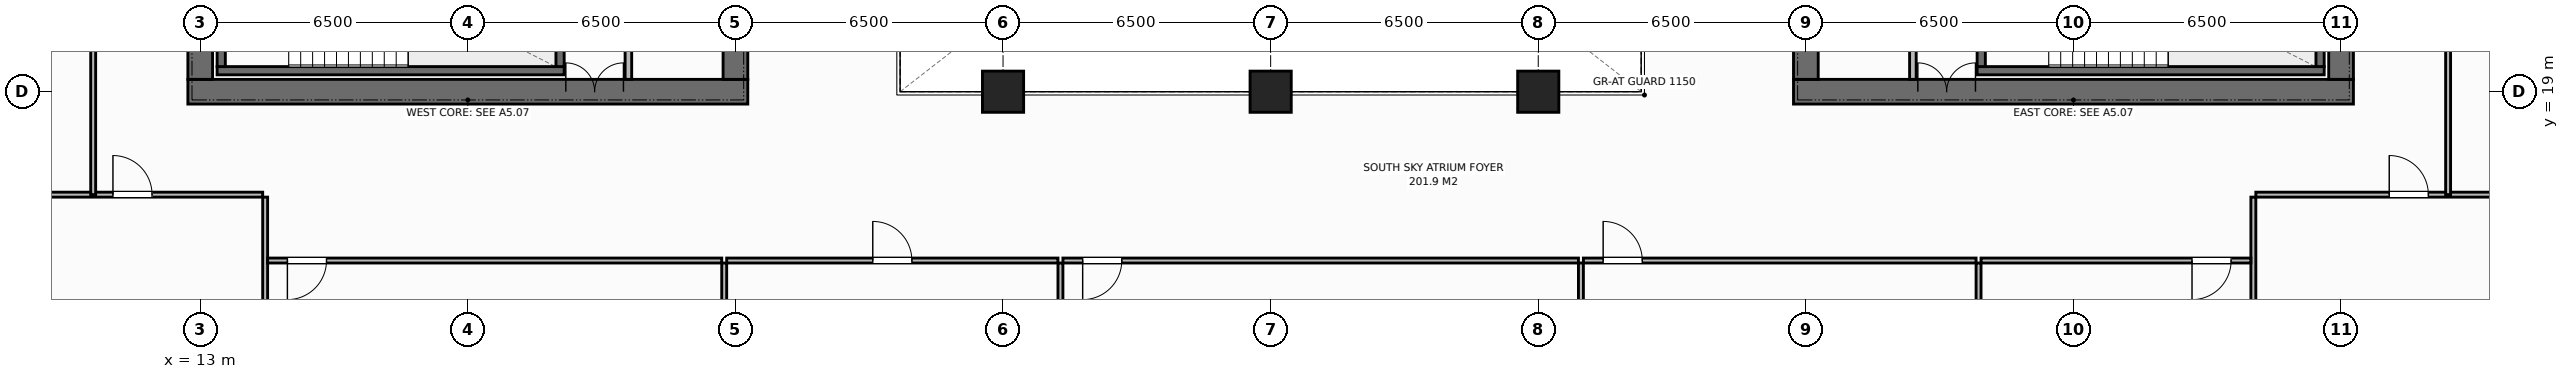
"""IFC4 building model, lengths in metres.
Left out: names, types, materials, properties, quantities, classifications, styles, units other than length and angle.
Written with IfcOpenShell. Run it as: python <this file> out.ifc"""

import sys

from ifc_helpers import new_model, si_unit, direction, frame, frame_2d, origin, origin_2d, place, context, subcontext, project, spatial, rectangle, extrude, element, fill, save


model = new_model("IFC4")
c1 = context("Model", 3, precision=1e-05, world=origin(), true_north=direction((0.0, 1.0)))
c2 = subcontext(c1, "Body", "Model", "MODEL_VIEW")
j1 = project(units=[si_unit("LENGTHUNIT", "METRE"), si_unit("PLANEANGLEUNIT", "RADIAN")], contexts=[c1])
p1 = place(None, origin())
s1 = spatial("IfcSite", under=j1, at=p1, CompositionType="ELEMENT")
p2 = place(p1, origin())
s2 = spatial("IfcBuilding", under=s1, at=p2, CompositionType="ELEMENT")
p3 = place(p2, frame((0.0, 0.0, 193.6)))
s3 = spatial("IfcBuildingStorey", under=s2, at=p3, CompositionType="ELEMENT", Elevation=193.6)
p4 = place(p3, frame((12.7, 19.0, 0.0), z_axis=(0.0, 0.0, 1.0), x_axis=(1.0, 0.0, 0.0)))
e1 = element("IfcWall", 1, at=p4, inside=s3, PredefinedType="SHEAR", context=c2, shape_type="SweptSolid", body=[
    extrude(rectangle(XDim=13.6, YDim=0.6, at=frame_2d((6.8, 0.0))), origin(), (0.0, 0.0, 1.0), 3.8),
])
p5 = place(p4, frame((9.18, 0.0, 0.0)))
e2 = element("IfcOpeningElement", 2, at=p5, cuts=e1, PredefinedType="OPENING", context=c2, shape_type="SweptSolid", body=[
    extrude(rectangle(XDim=1.4, YDim=2.2, at=frame_2d((0.7, 1.1))), frame((0.0, 0.31, 0.0), z_axis=(0.0, -1.0, 0.0), x_axis=(1.0, 0.0, 0.0)), (0.0, 0.0, 1.0), 0.62),
])
p6 = place(p3, frame((13.0, 19.3, 0.0), z_axis=(0.0, 0.0, 1.0), x_axis=(0.0, 1.0, 0.0)))
e3 = element("IfcWall", 3, at=p6, inside=s3, PredefinedType="SHEAR", context=c2, shape_type="SweptSolid", body=[
    extrude(rectangle(XDim=13.4, YDim=0.6, at=frame_2d((6.7, 0.0))), origin(), (0.0, 0.0, 1.0), 3.8),
])
p7 = place(p6, frame((4.75, 0.0, 0.0)))
e4 = element("IfcOpeningElement", 4, at=p7, cuts=e3, PredefinedType="OPENING", context=c2, shape_type="SweptSolid", body=[
    extrude(rectangle(XDim=1.4, YDim=2.2, at=frame_2d((0.7, 1.1))), frame((0.0, 0.31, 0.0), z_axis=(0.0, -1.0, 0.0), x_axis=(1.0, 0.0, 0.0)), (0.0, 0.0, 1.0), 0.62),
])
p8 = place(p3, frame((26.0, 19.3, 0.0), z_axis=(0.0, 0.0, 1.0), x_axis=(0.0, 1.0, 0.0)))
e5 = element("IfcWall", 5, at=p8, inside=s3, PredefinedType="SHEAR", context=c2, shape_type="SweptSolid", body=[
    extrude(rectangle(XDim=13.4, YDim=0.6, at=frame_2d((6.7, 0.0))), origin(), (0.0, 0.0, 1.0), 3.8),
])
p9 = place(p3, frame((51.7, 19.0, 0.0), z_axis=(0.0, 0.0, 1.0), x_axis=(1.0, 0.0, 0.0)))
e6 = element("IfcWall", 6, at=p9, inside=s3, PredefinedType="SHEAR", context=c2, shape_type="SweptSolid", body=[
    extrude(rectangle(XDim=13.6, YDim=0.6, at=frame_2d((6.8, 0.0))), origin(), (0.0, 0.0, 1.0), 3.8),
])
p10 = place(p9, frame((3.02, 0.0, 0.0)))
e7 = element("IfcOpeningElement", 7, at=p10, cuts=e6, PredefinedType="OPENING", context=c2, shape_type="SweptSolid", body=[
    extrude(rectangle(XDim=1.4, YDim=2.2, at=frame_2d((0.7, 1.1))), frame((0.0, 0.31, 0.0), z_axis=(0.0, -1.0, 0.0), x_axis=(1.0, 0.0, 0.0)), (0.0, 0.0, 1.0), 0.62),
])
p11 = place(p3, frame((52.0, 19.3, 0.0), z_axis=(0.0, 0.0, 1.0), x_axis=(0.0, 1.0, 0.0)))
e8 = element("IfcWall", 8, at=p11, inside=s3, PredefinedType="SHEAR", context=c2, shape_type="SweptSolid", body=[
    extrude(rectangle(XDim=13.4, YDim=0.6, at=frame_2d((6.7, 0.0))), origin(), (0.0, 0.0, 1.0), 3.8),
])
p12 = place(p3, frame((65.0, 19.3, 0.0), z_axis=(0.0, 0.0, 1.0), x_axis=(0.0, 1.0, 0.0)))
e9 = element("IfcWall", 9, at=p12, inside=s3, PredefinedType="SHEAR", context=c2, shape_type="SweptSolid", body=[
    extrude(rectangle(XDim=13.4, YDim=0.6, at=frame_2d((6.7, 0.0))), origin(), (0.0, 0.0, 1.0), 3.8),
])
p13 = place(p12, frame((8.15, 0.0, 0.0)))
e10 = element("IfcOpeningElement", 10, at=p13, cuts=e9, PredefinedType="OPENING", context=c2, shape_type="SweptSolid", body=[
    extrude(rectangle(XDim=1.3, YDim=2.2, at=frame_2d((0.65, 1.1))), frame((0.0, 0.31, 0.0), z_axis=(0.0, -1.0, 0.0), x_axis=(1.0, 0.0, 0.0)), (0.0, 0.0, 1.0), 0.62),
])
p14 = place(p3, frame((13.41, 19.51, 0.0), z_axis=(0.0, 0.0, 1.0), x_axis=(1.0, 0.0, 0.0)))
e11 = element("IfcWall", 11, at=p14, inside=s3, PredefinedType="SHEAR", context=c2, shape_type="SweptSolid", body=[
    extrude(rectangle(XDim=8.43, YDim=0.2, at=frame_2d((4.215, 0.0))), origin(), (0.0, 0.0, 1.0), 3.8),
])
for number, where, z_axis, x_axis in (
    (12, (13.51, 19.61, 0.0), (0.0, 0.0, 1.0), (0.0, 1.0, 0.0)),
    (13, (21.74, 19.61, 0.0), (0.0, 0.0, 1.0), (0.0, 1.0, 0.0)),
):
    element("IfcWall", number, at=place(p3, frame(where, z_axis=z_axis, x_axis=x_axis)), inside=s3, PredefinedType="SHEAR", context=c2, shape_type="SweptSolid", body=[
        extrude(rectangle(XDim=3.28, YDim=0.2, at=frame_2d((1.64, 0.0))), origin(), (0.0, 0.0, 1.0), 3.8),
    ])
p15 = place(p3, frame((56.16, 19.51, 0.0), z_axis=(0.0, 0.0, 1.0), x_axis=(1.0, 0.0, 0.0)))
e14 = element("IfcWall", 14, at=p15, inside=s3, PredefinedType="SHEAR", context=c2, shape_type="SweptSolid", body=[
    extrude(rectangle(XDim=8.43, YDim=0.2, at=frame_2d((4.215, 0.0))), origin(), (0.0, 0.0, 1.0), 3.8),
])
for number, where, z_axis, x_axis in (
    (15, (56.26, 19.61, 0.0), (0.0, 0.0, 1.0), (0.0, 1.0, 0.0)),
    (16, (64.49, 19.61, 0.0), (0.0, 0.0, 1.0), (0.0, 1.0, 0.0)),
):
    element("IfcWall", number, at=place(p3, frame(where, z_axis=z_axis, x_axis=x_axis)), inside=s3, PredefinedType="SHEAR", context=c2, shape_type="SweptSolid", body=[
        extrude(rectangle(XDim=3.28, YDim=0.2, at=frame_2d((1.64, 0.0))), origin(), (0.0, 0.0, 1.0), 3.8),
    ])
for number, where, z_axis, x_axis in (
    (17, (32.5, 19.0, 0.0), (0.0, 0.0, 1.0), (1.0, 0.0, 0.0)),
    (18, (39.0, 19.0, 0.0), (0.0, 0.0, 1.0), (1.0, 0.0, 0.0)),
    (19, (45.5, 19.0, 0.0), (0.0, 0.0, 1.0), (1.0, 0.0, 0.0)),
):
    element("IfcColumn", number, at=place(p3, frame(where, z_axis=z_axis, x_axis=x_axis)), inside=s3, PredefinedType="COLUMN", context=c2, shape_type="SweptSolid", body=[
        extrude(rectangle(XDim=1.0, YDim=1.0, at=origin_2d()), origin(), (0.0, 0.0, 1.0), 3.8),
    ])
p16 = place(p3, frame((23.4, 19.3, 0.0), z_axis=(0.0, 0.0, 1.0), x_axis=(0.0, 1.0, 0.0)))
e20 = element("IfcWall", 20, at=p16, inside=s3, PredefinedType="STANDARD", context=c2, shape_type="SweptSolid", body=[
    extrude(rectangle(XDim=13.4, YDim=0.16, at=frame_2d((6.7, 0.0))), origin(), (0.0, 0.0, 1.0), 3.52),
])
p17 = place(p16, frame((2.2, 0.0, 0.0)))
e21 = element("IfcOpeningElement", 21, at=p17, cuts=e20, PredefinedType="OPENING", context=c2, shape_type="SweptSolid", body=[
    extrude(rectangle(XDim=0.95, YDim=2.15, at=frame_2d((0.475, 1.075))), frame((0.0, 0.09, 0.0), z_axis=(0.0, -1.0, 0.0), x_axis=(1.0, 0.0, 0.0)), (0.0, 0.0, 1.0), 0.18),
])
p18 = place(p16, frame((6.3, 0.0, 0.0)))
e22 = element("IfcOpeningElement", 22, at=p18, cuts=e20, PredefinedType="OPENING", context=c2, shape_type="SweptSolid", body=[
    extrude(rectangle(XDim=0.95, YDim=2.15, at=frame_2d((0.475, 1.075))), frame((0.0, 0.09, 0.0), z_axis=(0.0, -1.0, 0.0), x_axis=(1.0, 0.0, 0.0)), (0.0, 0.0, 1.0), 0.18),
])
p19 = place(p16, frame((9.3, 0.0, 0.0)))
e23 = element("IfcOpeningElement", 23, at=p19, cuts=e20, PredefinedType="OPENING", context=c2, shape_type="SweptSolid", body=[
    extrude(rectangle(XDim=1.1, YDim=2.2, at=frame_2d((0.55, 1.1))), frame((0.0, 0.09, 0.0), z_axis=(0.0, -1.0, 0.0), x_axis=(1.0, 0.0, 0.0)), (0.0, 0.0, 1.0), 0.18),
])
p20 = place(p16, frame((11.5, 0.0, 0.0)))
e24 = element("IfcOpeningElement", 24, at=p20, cuts=e20, PredefinedType="OPENING", context=c2, shape_type="SweptSolid", body=[
    extrude(rectangle(XDim=1.1, YDim=2.2, at=frame_2d((0.55, 1.1))), frame((0.0, 0.09, 0.0), z_axis=(0.0, -1.0, 0.0), x_axis=(1.0, 0.0, 0.0)), (0.0, 0.0, 1.0), 0.18),
])
p21 = place(p3, frame((54.6, 19.3, 0.0), z_axis=(0.0, 0.0, 1.0), x_axis=(0.0, 1.0, 0.0)))
e25 = element("IfcWall", 25, at=p21, inside=s3, PredefinedType="STANDARD", context=c2, shape_type="SweptSolid", body=[
    extrude(rectangle(XDim=13.4, YDim=0.16, at=frame_2d((6.7, 0.0))), origin(), (0.0, 0.0, 1.0), 3.52),
])
p22 = place(p21, frame((2.1, 0.0, 0.0)))
e26 = element("IfcOpeningElement", 26, at=p22, cuts=e25, PredefinedType="OPENING", context=c2, shape_type="SweptSolid", body=[
    extrude(rectangle(XDim=0.95, YDim=2.15, at=frame_2d((0.475, 1.075))), frame((0.0, 0.09, 0.0), z_axis=(0.0, -1.0, 0.0), x_axis=(1.0, 0.0, 0.0)), (0.0, 0.0, 1.0), 0.18),
])
p23 = place(p21, frame((6.2, 0.0, 0.0)))
e27 = element("IfcOpeningElement", 27, at=p23, cuts=e25, PredefinedType="OPENING", context=c2, shape_type="SweptSolid", body=[
    extrude(rectangle(XDim=0.95, YDim=2.15, at=frame_2d((0.475, 1.075))), frame((0.0, 0.09, 0.0), z_axis=(0.0, -1.0, 0.0), x_axis=(1.0, 0.0, 0.0)), (0.0, 0.0, 1.0), 0.18),
])
p24 = place(p21, frame((9.3, 0.0, 0.0)))
e28 = element("IfcOpeningElement", 28, at=p24, cuts=e25, PredefinedType="OPENING", context=c2, shape_type="SweptSolid", body=[
    extrude(rectangle(XDim=1.1, YDim=2.2, at=frame_2d((0.55, 1.1))), frame((0.0, 0.09, 0.0), z_axis=(0.0, -1.0, 0.0), x_axis=(1.0, 0.0, 0.0)), (0.0, 0.0, 1.0), 0.18),
])
p25 = place(p21, frame((11.5, 0.0, 0.0)))
e29 = element("IfcOpeningElement", 29, at=p25, cuts=e25, PredefinedType="OPENING", context=c2, shape_type="SweptSolid", body=[
    extrude(rectangle(XDim=1.1, YDim=2.2, at=frame_2d((0.55, 1.1))), frame((0.0, 0.09, 0.0), z_axis=(0.0, -1.0, 0.0), x_axis=(1.0, 0.0, 0.0)), (0.0, 0.0, 1.0), 0.18),
])
p26 = place(p3, frame((14.577, 3.42, 0.0), z_axis=(0.0, 0.0, 1.0), x_axis=(0.0, 1.0, 0.0)))
e30 = element("IfcWall", 30, at=p26, inside=s3, PredefinedType="PARTITIONING", context=c2, shape_type="SweptSolid", body=[
    extrude(rectangle(XDim=13.02, YDim=0.12, at=frame_2d((6.51, 0.0))), origin(), (0.0, 0.0, 1.0), 3.52),
])
p27 = place(p3, frame((3.98, 16.5, 0.0), z_axis=(0.0, 0.0, 1.0), x_axis=(1.0, 0.0, 0.0)))
e31 = element("IfcWall", 31, at=p27, inside=s3, PredefinedType="PARTITIONING", context=c2, shape_type="SweptSolid", body=[
    extrude(rectangle(XDim=10.537, YDim=0.12, at=frame_2d((5.269, 0.0))), origin(), (0.0, 0.0, 1.0), 3.52),
])
p28 = place(p27, frame((6.9, 0.0, 0.0)))
e32 = element("IfcOpeningElement", 32, at=p28, cuts=e31, PredefinedType="OPENING", context=c2, shape_type="SweptSolid", body=[
    extrude(rectangle(XDim=0.95, YDim=2.15, at=frame_2d((0.475, 1.075))), frame((0.0, 0.07, 0.0), z_axis=(0.0, -1.0, 0.0), x_axis=(1.0, 0.0, 0.0)), (0.0, 0.0, 1.0), 0.14),
])
p29 = place(p3, frame((25.727, 3.42, 0.0), z_axis=(0.0, 0.0, 1.0), x_axis=(0.0, 1.0, 0.0)))
e33 = element("IfcWall", 33, at=p29, inside=s3, PredefinedType="PARTITIONING", context=c2, shape_type="SweptSolid", body=[
    extrude(rectangle(XDim=11.42, YDim=0.12, at=frame_2d((5.71, 0.0))), origin(), (0.0, 0.0, 1.0), 3.52),
])
p30 = place(p3, frame((14.637, 14.9, 0.0), z_axis=(0.0, 0.0, 1.0), x_axis=(1.0, 0.0, 0.0)))
e34 = element("IfcWall", 34, at=p30, inside=s3, PredefinedType="PARTITIONING", context=c2, shape_type="SweptSolid", body=[
    extrude(rectangle(XDim=11.03, YDim=0.12, at=frame_2d((5.515, 0.0))), origin(), (0.0, 0.0, 1.0), 3.52),
])
p31 = place(p30, frame((0.48, 0.0, 0.0)))
e35 = element("IfcOpeningElement", 35, at=p31, cuts=e34, PredefinedType="OPENING", context=c2, shape_type="SweptSolid", body=[
    extrude(rectangle(XDim=0.95, YDim=2.15, at=frame_2d((0.475, 1.075))), frame((0.0, 0.07, 0.0), z_axis=(0.0, -1.0, 0.0), x_axis=(1.0, 0.0, 0.0)), (0.0, 0.0, 1.0), 0.14),
])
p32 = place(p3, frame((33.894, 3.42, 0.0), z_axis=(0.0, 0.0, 1.0), x_axis=(0.0, 1.0, 0.0)))
e36 = element("IfcWall", 36, at=p32, inside=s3, PredefinedType="PARTITIONING", context=c2, shape_type="SweptSolid", body=[
    extrude(rectangle(XDim=11.42, YDim=0.12, at=frame_2d((5.71, 0.0))), origin(), (0.0, 0.0, 1.0), 3.52),
])
p33 = place(p3, frame((25.787, 14.9, 0.0), z_axis=(0.0, 0.0, 1.0), x_axis=(1.0, 0.0, 0.0)))
e37 = element("IfcWall", 37, at=p33, inside=s3, PredefinedType="PARTITIONING", context=c2, shape_type="SweptSolid", body=[
    extrude(rectangle(XDim=8.047, YDim=0.12, at=frame_2d((4.023, 0.0))), origin(), (0.0, 0.0, 1.0), 3.52),
])
p34 = place(p33, frame((3.548, 0.0, 0.0)))
e38 = element("IfcOpeningElement", 38, at=p34, cuts=e37, PredefinedType="OPENING", context=c2, shape_type="SweptSolid", body=[
    extrude(rectangle(XDim=0.95, YDim=2.15, at=frame_2d((0.475, 1.075))), frame((0.0, 0.07, 0.0), z_axis=(0.0, -1.0, 0.0), x_axis=(1.0, 0.0, 0.0)), (0.0, 0.0, 1.0), 0.14),
])
p35 = place(p3, frame((46.536, 3.42, 0.0), z_axis=(0.0, 0.0, 1.0), x_axis=(0.0, 1.0, 0.0)))
e39 = element("IfcWall", 39, at=p35, inside=s3, PredefinedType="PARTITIONING", context=c2, shape_type="SweptSolid", body=[
    extrude(rectangle(XDim=11.42, YDim=0.12, at=frame_2d((5.71, 0.0))), origin(), (0.0, 0.0, 1.0), 3.52),
])
p36 = place(p3, frame((33.954, 14.9, 0.0), z_axis=(0.0, 0.0, 1.0), x_axis=(1.0, 0.0, 0.0)))
e40 = element("IfcWall", 40, at=p36, inside=s3, PredefinedType="PARTITIONING", context=c2, shape_type="SweptSolid", body=[
    extrude(rectangle(XDim=12.522, YDim=0.12, at=frame_2d((6.261, 0.0))), origin(), (0.0, 0.0, 1.0), 3.52),
])
p37 = place(p36, frame((0.48, 0.0, 0.0)))
e41 = element("IfcOpeningElement", 41, at=p37, cuts=e40, PredefinedType="OPENING", context=c2, shape_type="SweptSolid", body=[
    extrude(rectangle(XDim=0.95, YDim=2.15, at=frame_2d((0.475, 1.075))), frame((0.0, 0.07, 0.0), z_axis=(0.0, -1.0, 0.0), x_axis=(1.0, 0.0, 0.0)), (0.0, 0.0, 1.0), 0.14),
])
p38 = place(p3, frame((56.195, 3.42, 0.0), z_axis=(0.0, 0.0, 1.0), x_axis=(0.0, 1.0, 0.0)))
e42 = element("IfcWall", 42, at=p38, inside=s3, PredefinedType="PARTITIONING", context=c2, shape_type="SweptSolid", body=[
    extrude(rectangle(XDim=11.42, YDim=0.12, at=frame_2d((5.71, 0.0))), origin(), (0.0, 0.0, 1.0), 3.52),
])
p39 = place(p3, frame((46.596, 14.9, 0.0), z_axis=(0.0, 0.0, 1.0), x_axis=(1.0, 0.0, 0.0)))
e43 = element("IfcWall", 43, at=p39, inside=s3, PredefinedType="PARTITIONING", context=c2, shape_type="SweptSolid", body=[
    extrude(rectangle(XDim=9.539, YDim=0.12, at=frame_2d((4.769, 0.0))), origin(), (0.0, 0.0, 1.0), 3.52),
])
p40 = place(p39, frame((0.48, 0.0, 0.0)))
e44 = element("IfcOpeningElement", 44, at=p40, cuts=e43, PredefinedType="OPENING", context=c2, shape_type="SweptSolid", body=[
    extrude(rectangle(XDim=0.95, YDim=2.15, at=frame_2d((0.475, 1.075))), frame((0.0, 0.07, 0.0), z_axis=(0.0, -1.0, 0.0), x_axis=(1.0, 0.0, 0.0)), (0.0, 0.0, 1.0), 0.14),
])
p41 = place(p3, frame((62.87, 3.42, 0.0), z_axis=(0.0, 0.0, 1.0), x_axis=(0.0, 1.0, 0.0)))
e45 = element("IfcWall", 45, at=p41, inside=s3, PredefinedType="PARTITIONING", context=c2, shape_type="SweptSolid", body=[
    extrude(rectangle(XDim=13.02, YDim=0.12, at=frame_2d((6.51, 0.0))), origin(), (0.0, 0.0, 1.0), 3.52),
])
p42 = place(p3, frame((56.255, 14.9, 0.0), z_axis=(0.0, 0.0, 1.0), x_axis=(1.0, 0.0, 0.0)))
e46 = element("IfcWall", 46, at=p42, inside=s3, PredefinedType="PARTITIONING", context=c2, shape_type="SweptSolid", body=[
    extrude(rectangle(XDim=6.555, YDim=0.12, at=frame_2d((3.277, 0.0))), origin(), (0.0, 0.0, 1.0), 3.52),
])
p43 = place(p42, frame((5.125, 0.0, 0.0)))
e47 = element("IfcOpeningElement", 47, at=p43, cuts=e46, PredefinedType="OPENING", context=c2, shape_type="SweptSolid", body=[
    extrude(rectangle(XDim=0.95, YDim=2.15, at=frame_2d((0.475, 1.075))), frame((0.0, 0.07, 0.0), z_axis=(0.0, -1.0, 0.0), x_axis=(1.0, 0.0, 0.0)), (0.0, 0.0, 1.0), 0.14),
])
p44 = place(p3, frame((62.93, 16.5, 0.0), z_axis=(0.0, 0.0, 1.0), x_axis=(1.0, 0.0, 0.0)))
e48 = element("IfcWall", 48, at=p44, inside=s3, PredefinedType="PARTITIONING", context=c2, shape_type="SweptSolid", body=[
    extrude(rectangle(XDim=11.09, YDim=0.12, at=frame_2d((5.545, 0.0))), origin(), (0.0, 0.0, 1.0), 3.52),
])
p45 = place(p44, frame((3.24, 0.0, 0.0)))
e49 = element("IfcOpeningElement", 49, at=p45, cuts=e48, PredefinedType="OPENING", context=c2, shape_type="SweptSolid", body=[
    extrude(rectangle(XDim=0.95, YDim=2.15, at=frame_2d((0.475, 1.075))), frame((0.0, 0.07, 0.0), z_axis=(0.0, -1.0, 0.0), x_axis=(1.0, 0.0, 0.0)), (0.0, 0.0, 1.0), 0.14),
])
p46 = place(p3, frame((10.4, 16.5, 0.0), z_axis=(0.0, 0.0, 1.0), x_axis=(0.0, 1.0, 0.0)))
e50 = element("IfcWall", 50, at=p46, inside=s3, PredefinedType="PARTITIONING", context=c2, shape_type="SweptSolid", body=[
    extrude(rectangle(XDim=6.333, YDim=0.12, at=frame_2d((3.167, 0.0))), origin(), (0.0, 0.0, 1.0), 3.52),
])
p47 = place(p46, frame((3.742, 0.0, 0.0)))
e51 = element("IfcOpeningElement", 51, at=p47, cuts=e50, PredefinedType="OPENING", context=c2, shape_type="SweptSolid", body=[
    extrude(rectangle(XDim=0.95, YDim=2.15, at=frame_2d((0.475, 1.075))), frame((0.0, 0.07, 0.0), z_axis=(0.0, -1.0, 0.0), x_axis=(1.0, 0.0, 0.0)), (0.0, 0.0, 1.0), 0.14),
])
p48 = place(p3, frame((67.6, 16.5, 0.0), z_axis=(0.0, 0.0, 1.0), x_axis=(0.0, 1.0, 0.0)))
e52 = element("IfcWall", 52, at=p48, inside=s3, PredefinedType="PARTITIONING", context=c2, shape_type="SweptSolid", body=[
    extrude(rectangle(XDim=16.9, YDim=0.12, at=frame_2d((8.45, 0.0))), origin(), (0.0, 0.0, 1.0), 3.52),
])
p49 = place(p48, frame((9.025, 0.0, 0.0)))
e53 = element("IfcOpeningElement", 53, at=p49, cuts=e52, PredefinedType="OPENING", context=c2, shape_type="SweptSolid", body=[
    extrude(rectangle(XDim=0.95, YDim=2.15, at=frame_2d((0.475, 1.075))), frame((0.0, 0.07, 0.0), z_axis=(0.0, -1.0, 0.0), x_axis=(1.0, 0.0, 0.0)), (0.0, 0.0, 1.0), 0.14),
])
p50 = place(p5, origin())
e54 = element("IfcDoor", 54, at=p50, inside=s3, OperationType="DOUBLE_DOOR_SINGLE_SWING", PredefinedType="DOOR", context=c2, shape_type="SweptSolid", body=[
    extrude(rectangle(XDim=1.4, YDim=2.2, at=frame_2d((0.7, 1.1))), frame((0.0, 0.075, 0.0), z_axis=(0.0, -1.0, 0.0), x_axis=(1.0, 0.0, 0.0)), (0.0, 0.0, 1.0), 0.05),
])
fill(e2, e54)
p51 = place(p10, origin())
e55 = element("IfcDoor", 55, at=p51, inside=s3, OperationType="DOUBLE_DOOR_SINGLE_SWING", PredefinedType="DOOR", context=c2, shape_type="SweptSolid", body=[
    extrude(rectangle(XDim=1.4, YDim=2.2, at=frame_2d((0.7, 1.1))), frame((0.0, 0.075, 0.0), z_axis=(0.0, -1.0, 0.0), x_axis=(1.0, 0.0, 0.0)), (0.0, 0.0, 1.0), 0.05),
])
fill(e7, e55)
p52 = place(p28, origin())
e56 = element("IfcDoor", 56, at=p52, inside=s3, OperationType="SINGLE_SWING_LEFT", PredefinedType="DOOR", context=c2, shape_type="SweptSolid", body=[
    extrude(rectangle(XDim=0.95, YDim=2.15, at=frame_2d((0.475, 1.075))), frame((0.0, 0.025, 0.0), z_axis=(0.0, -1.0, 0.0), x_axis=(1.0, 0.0, 0.0)), (0.0, 0.0, 1.0), 0.05),
])
fill(e32, e56)
p53 = place(p31, origin())
e57 = element("IfcDoor", 57, at=p53, inside=s3, OperationType="SINGLE_SWING_RIGHT", PredefinedType="DOOR", context=c2, shape_type="SweptSolid", body=[
    extrude(rectangle(XDim=0.95, YDim=2.15, at=frame_2d((0.475, 1.075))), frame((0.0, 0.025, 0.0), z_axis=(0.0, -1.0, 0.0), x_axis=(1.0, 0.0, 0.0)), (0.0, 0.0, 1.0), 0.05),
])
fill(e35, e57)
p54 = place(p34, origin())
e58 = element("IfcDoor", 58, at=p54, inside=s3, OperationType="SINGLE_SWING_LEFT", PredefinedType="DOOR", context=c2, shape_type="SweptSolid", body=[
    extrude(rectangle(XDim=0.95, YDim=2.15, at=frame_2d((0.475, 1.075))), frame((0.0, 0.025, 0.0), z_axis=(0.0, -1.0, 0.0), x_axis=(1.0, 0.0, 0.0)), (0.0, 0.0, 1.0), 0.05),
])
fill(e38, e58)
p55 = place(p37, origin())
e59 = element("IfcDoor", 59, at=p55, inside=s3, OperationType="SINGLE_SWING_RIGHT", PredefinedType="DOOR", context=c2, shape_type="SweptSolid", body=[
    extrude(rectangle(XDim=0.95, YDim=2.15, at=frame_2d((0.475, 1.075))), frame((0.0, 0.025, 0.0), z_axis=(0.0, -1.0, 0.0), x_axis=(1.0, 0.0, 0.0)), (0.0, 0.0, 1.0), 0.05),
])
fill(e41, e59)
p56 = place(p40, origin())
e60 = element("IfcDoor", 60, at=p56, inside=s3, OperationType="SINGLE_SWING_LEFT", PredefinedType="DOOR", context=c2, shape_type="SweptSolid", body=[
    extrude(rectangle(XDim=0.95, YDim=2.15, at=frame_2d((0.475, 1.075))), frame((0.0, 0.025, 0.0), z_axis=(0.0, -1.0, 0.0), x_axis=(1.0, 0.0, 0.0)), (0.0, 0.0, 1.0), 0.05),
])
fill(e44, e60)
p57 = place(p43, origin())
e61 = element("IfcDoor", 61, at=p57, inside=s3, OperationType="SINGLE_SWING_RIGHT", PredefinedType="DOOR", context=c2, shape_type="SweptSolid", body=[
    extrude(rectangle(XDim=0.95, YDim=2.15, at=frame_2d((0.475, 1.075))), frame((0.0, 0.025, 0.0), z_axis=(0.0, -1.0, 0.0), x_axis=(1.0, 0.0, 0.0)), (0.0, 0.0, 1.0), 0.05),
])
fill(e47, e61)
p58 = place(p45, origin())
e62 = element("IfcDoor", 62, at=p58, inside=s3, OperationType="SINGLE_SWING_LEFT", PredefinedType="DOOR", context=c2, shape_type="SweptSolid", body=[
    extrude(rectangle(XDim=0.95, YDim=2.15, at=frame_2d((0.475, 1.075))), frame((0.0, 0.025, 0.0), z_axis=(0.0, -1.0, 0.0), x_axis=(1.0, 0.0, 0.0)), (0.0, 0.0, 1.0), 0.05),
])
fill(e49, e62)
save(model, sys.argv[1])
